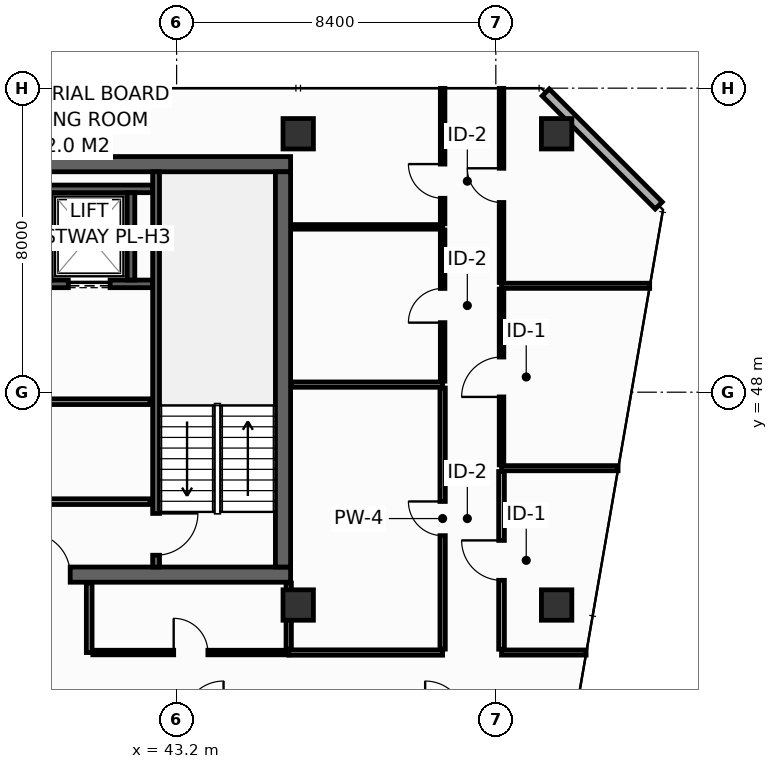
"""IFC4 building model, lengths in metres.
Left out: names, types, materials, properties, quantities, classifications, styles, units other than length and angle.
Written with IfcOpenShell. Run it as: python <this file> out.ifc"""

import sys

from ifc_helpers import new_model, si_unit, direction, frame, frame_2d, origin, origin_2d, place, context, subcontext, project, spatial, rectangle, hollow_rectangle, extrude, element, fill, save


model = new_model("IFC4")
c1 = context("Model", 3, precision=1e-05, world=origin(), true_north=direction((0.0, 1.0)))
c2 = subcontext(c1, "Body", "Model", "MODEL_VIEW")
j1 = project(units=[si_unit("LENGTHUNIT", "METRE"), si_unit("PLANEANGLEUNIT", "RADIAN")], contexts=[c1])
p1 = place(None, origin())
s1 = spatial("IfcSite", under=j1, at=p1, CompositionType="ELEMENT")
p2 = place(p1, origin())
s2 = spatial("IfcBuilding", under=s1, at=p2, CompositionType="ELEMENT")
p3 = place(p2, frame((0.0, 0.0, 245.8)))
s3 = spatial("IfcBuildingStorey", under=s2, at=p3, CompositionType="ELEMENT", Elevation=245.8)
p4 = place(p3, frame((13.7, 43.2, 0.0), z_axis=(0.0, 0.0, 1.0), x_axis=(1.0, 0.0, 0.0)))
e1 = element("IfcWall", 1, at=p4, inside=s3, PredefinedType="SHEAR", context=c2, shape_type="SweptSolid", body=[
    extrude(rectangle(XDim=32.5, YDim=0.4, at=frame_2d((16.25, 0.0))), origin(), (0.0, 0.0, 1.0), 3.55),
])
p5 = place(p4, frame((5.4, 0.0, 0.0)))
e2 = element("IfcOpeningElement", 2, at=p5, cuts=e1, PredefinedType="OPENING", context=c2, shape_type="SweptSolid", body=[
    extrude(rectangle(XDim=1.1, YDim=2.15, at=frame_2d((0.55, 1.075))), frame((0.0, 0.21, 0.0), z_axis=(0.0, -1.0, 0.0), x_axis=(1.0, 0.0, 0.0)), (0.0, 0.0, 1.0), 0.42),
])
p6 = place(p4, frame((25.6, 0.0, 0.0)))
e3 = element("IfcOpeningElement", 3, at=p6, cuts=e1, PredefinedType="OPENING", context=c2, shape_type="SweptSolid", body=[
    extrude(rectangle(XDim=1.1, YDim=2.15, at=frame_2d((0.55, 1.075))), frame((0.0, 0.21, 0.0), z_axis=(0.0, -1.0, 0.0), x_axis=(1.0, 0.0, 0.0)), (0.0, 0.0, 1.0), 0.42),
])
p7 = place(p3, frame((13.7, 54.0, 0.0), z_axis=(0.0, 0.0, 1.0), x_axis=(1.0, 0.0, 0.0)))
e4 = element("IfcWall", 4, at=p7, inside=s3, PredefinedType="SHEAR", context=c2, shape_type="SweptSolid", body=[
    extrude(rectangle(XDim=32.5, YDim=0.4, at=frame_2d((16.25, 0.0))), origin(), (0.0, 0.0, 1.0), 3.55),
])
p8 = place(p3, frame((46.0, 43.4, 0.0), z_axis=(0.0, 0.0, 1.0), x_axis=(0.0, 1.0, 0.0)))
e5 = element("IfcWall", 5, at=p8, inside=s3, PredefinedType="SHEAR", context=c2, shape_type="SweptSolid", body=[
    extrude(rectangle(XDim=10.4, YDim=0.4, at=frame_2d((5.2, 0.0))), origin(), (0.0, 0.0, 1.0), 3.55),
])
for number, where, z_axis, x_axis in (
    (6, (46.4, 54.8, 0.0), (0.0, 0.0, 1.0), (1.0, 0.0, 0.0)),
    (7, (53.2, 54.8, 0.0), (0.0, 0.0, 1.0), (1.0, 0.0, 0.0)),
    (8, (46.4, 42.4, 0.0), (0.0, 0.0, 1.0), (1.0, 0.0, 0.0)),
    (9, (53.2, 42.4, 0.0), (0.0, 0.0, 1.0), (1.0, 0.0, 0.0)),
):
    element("IfcColumn", number, at=place(p3, frame(where, z_axis=z_axis, x_axis=x_axis)), inside=s3, PredefinedType="COLUMN", context=c2, shape_type="SweptSolid", body=[
        extrude(hollow_rectangle(XDim=0.8, YDim=0.8, WallThickness=0.036, at=origin_2d()), origin(), (0.0, 0.0, 1.0), 3.8),
    ])
p9 = place(p3, frame((39.525, 50.85, 0.0), z_axis=(0.0, 0.0, 1.0), x_axis=(1.0, 0.0, 0.0)))
e10 = element("IfcWall", 10, at=p9, inside=s3, PredefinedType="SHEAR", context=c2, shape_type="SweptSolid", body=[
    extrude(rectangle(XDim=3.045, YDim=0.2, at=frame_2d((1.522, 0.0))), origin(), (0.0, 0.0, 1.0), 3.55),
])
p10 = place(p9, frame((0.825, 0.0, 0.0)))
e11 = element("IfcOpeningElement", 11, at=p10, cuts=e10, PredefinedType="OPENING", context=c2, shape_type="SweptSolid", body=[
    extrude(rectangle(XDim=1.1, YDim=2.2, at=frame_2d((0.55, 1.1))), frame((0.0, 0.11, 0.0), z_axis=(0.0, -1.0, 0.0), x_axis=(1.0, 0.0, 0.0)), (0.0, 0.0, 1.0), 0.22),
])
p11 = place(p3, frame((39.525, 53.35, 0.0), z_axis=(0.0, 0.0, 1.0), x_axis=(1.0, 0.0, 0.0)))
e12 = element("IfcWall", 12, at=p11, inside=s3, PredefinedType="SHEAR", context=c2, shape_type="SweptSolid", body=[
    extrude(rectangle(XDim=3.045, YDim=0.2, at=frame_2d((1.522, 0.0))), origin(), (0.0, 0.0, 1.0), 3.55),
])
p12 = place(p3, frame((42.0, 50.95, 0.0), z_axis=(0.0, 0.0, 1.0), x_axis=(0.0, 1.0, 0.0)))
e13 = element("IfcWall", 13, at=p12, inside=s3, PredefinedType="SHEAR", context=c2, shape_type="SweptSolid", body=[
    extrude(rectangle(XDim=2.3, YDim=0.2, at=frame_2d((1.15, 0.0))), origin(), (0.0, 0.0, 1.0), 3.55),
])
p13 = place(p3, frame((42.66, 53.8, 0.0), z_axis=(0.0, 0.0, 1.0), x_axis=(0.0, -1.0, 0.0)))
e14 = element("IfcWall", 14, at=p13, inside=s3, PredefinedType="SHEAR", context=c2, shape_type="SweptSolid", body=[
    extrude(rectangle(XDim=10.4, YDim=0.18, at=frame_2d((5.2, 0.0))), origin(), (0.0, 0.0, 1.0), 3.55),
])
p14 = place(p13, frame((8.99, 0.0, 0.0)))
e15 = element("IfcOpeningElement", 15, at=p14, cuts=e14, PredefinedType="OPENING", context=c2, shape_type="SweptSolid", body=[
    extrude(rectangle(XDim=1.1, YDim=2.15, at=frame_2d((0.55, 1.075))), frame((0.0, 0.1, 0.0), z_axis=(0.0, -1.0, 0.0), x_axis=(1.0, 0.0, 0.0)), (0.0, 0.0, 1.0), 0.2),
])
p15 = place(p3, frame((34.05, 45.12, 0.0), z_axis=(0.0, 0.0, 1.0), x_axis=(1.0, 0.0, 0.0)))
e16 = element("IfcWall", 16, at=p15, inside=s3, PredefinedType="PARTITIONING", context=c2, shape_type="SweptSolid", body=[
    extrude(rectangle(XDim=8.45, YDim=0.15, at=frame_2d((4.225, 0.0))), origin(), (0.0, 0.0, 1.0), 3.55),
])
p16 = place(p15, frame((3.6, 0.0, 0.0)))
e17 = element("IfcOpeningElement", 17, at=p16, cuts=e16, PredefinedType="OPENING", context=c2, shape_type="SweptSolid", body=[
    extrude(rectangle(XDim=0.95, YDim=2.15, at=frame_2d((0.475, 1.075))), frame((0.0, 0.085, 0.0), z_axis=(0.0, -1.0, 0.0), x_axis=(1.0, 0.0, 0.0)), (0.0, 0.0, 1.0), 0.17),
])
p17 = place(p3, frame((34.05, 47.75, 0.0), z_axis=(0.0, 0.0, 1.0), x_axis=(1.0, 0.0, 0.0)))
e18 = element("IfcWall", 18, at=p17, inside=s3, PredefinedType="PARTITIONING", context=c2, shape_type="SweptSolid", body=[
    extrude(rectangle(XDim=8.45, YDim=0.15, at=frame_2d((4.225, 0.0))), origin(), (0.0, 0.0, 1.0), 3.55),
])
p18 = place(p3, frame((55.887, 52.913, 0.0), z_axis=(0.0, 0.0, 1.0), x_axis=(-0.707106781187, 0.707106781187, 0.0)))
e19 = element("IfcWall", 19, at=p18, inside=s3, PredefinedType="STANDARD", context=c2, shape_type="SweptSolid", body=[
    extrude(rectangle(XDim=4.206, YDim=0.26, at=frame_2d((2.103, 0.0))), origin(), (0.0, 0.0, 1.0), 3.55),
])
p19 = place(p3, frame((46.15, 41.15, 0.0), z_axis=(0.0, 0.0, 1.0), x_axis=(1.0, 0.0, 0.0)))
e20 = element("IfcWall", 20, at=p19, inside=s3, PredefinedType="PARTITIONING", context=c2, shape_type="SweptSolid", body=[
    extrude(rectangle(XDim=4.05, YDim=0.14, at=frame_2d((2.025, 0.0))), origin(), (0.0, 0.0, 1.0), 3.55),
])
p20 = place(p3, frame((46.15, 41.24, 0.0), z_axis=(0.0, 0.0, 1.0), x_axis=(0.0, 1.0, 0.0)))
e21 = element("IfcWall", 21, at=p20, inside=s3, PredefinedType="PARTITIONING", context=c2, shape_type="SweptSolid", body=[
    extrude(rectangle(XDim=1.74, YDim=0.14, at=frame_2d((0.87, 0.0))), origin(), (0.0, 0.0, 1.0), 3.55),
])
p21 = place(p3, frame((46.22, 48.2, 0.0), z_axis=(0.0, 0.0, 1.0), x_axis=(1.0, 0.0, 0.0)))
e22 = element("IfcWall", 22, at=p21, inside=s3, PredefinedType="PARTITIONING", context=c2, shape_type="SweptSolid", body=[
    extrude(rectangle(XDim=3.98, YDim=0.14, at=frame_2d((1.99, 0.0))), origin(), (0.0, 0.0, 1.0), 3.55),
])
p22 = place(p3, frame((50.2, 41.24, 0.0), z_axis=(0.0, 0.0, 1.0), x_axis=(0.0, 1.0, 0.0)))
e23 = element("IfcWall", 23, at=p22, inside=s3, PredefinedType="PARTITIONING", context=c2, shape_type="SweptSolid", body=[
    extrude(rectangle(XDim=6.87, YDim=0.14, at=frame_2d((3.435, 0.0))), origin(), (0.0, 0.0, 1.0), 2.947),
])
p23 = place(p22, frame((2.985, 0.0, 0.0)))
e24 = element("IfcOpeningElement", 24, at=p23, cuts=e23, PredefinedType="OPENING", context=c2, shape_type="SweptSolid", body=[
    extrude(rectangle(XDim=0.9, YDim=2.1, at=frame_2d((0.45, 1.05))), frame((0.0, 0.08, 0.0), z_axis=(0.0, -1.0, 0.0), x_axis=(1.0, 0.0, 0.0)), (0.0, 0.0, 1.0), 0.16),
])
p24 = place(p3, frame((46.22, 52.35, 0.0), z_axis=(0.0, 0.0, 1.0), x_axis=(1.0, 0.0, 0.0)))
e25 = element("IfcWall", 25, at=p24, inside=s3, PredefinedType="PARTITIONING", context=c2, shape_type="SweptSolid", body=[
    extrude(rectangle(XDim=3.98, YDim=0.12, at=frame_2d((1.99, 0.0))), origin(), (0.0, 0.0, 1.0), 3.55),
])
p25 = place(p3, frame((50.2, 48.29, 0.0), z_axis=(0.0, 0.0, 1.0), x_axis=(0.0, 1.0, 0.0)))
e26 = element("IfcWall", 26, at=p25, inside=s3, PredefinedType="PARTITIONING", context=c2, shape_type="SweptSolid", body=[
    extrude(rectangle(XDim=3.98, YDim=0.12, at=frame_2d((1.99, 0.0))), origin(), (0.0, 0.0, 1.0), 3.55),
])
p26 = place(p25, frame((1.54, 0.0, 0.0)))
e27 = element("IfcOpeningElement", 27, at=p26, cuts=e26, PredefinedType="OPENING", context=c2, shape_type="SweptSolid", body=[
    extrude(rectangle(XDim=0.9, YDim=2.1, at=frame_2d((0.45, 1.05))), frame((0.0, 0.07, 0.0), z_axis=(0.0, -1.0, 0.0), x_axis=(1.0, 0.0, 0.0)), (0.0, 0.0, 1.0), 0.14),
])
p27 = place(p3, frame((50.2, 52.43, 0.0), z_axis=(0.0, 0.0, 1.0), x_axis=(0.0, 1.0, 0.0)))
e28 = element("IfcWall", 28, at=p27, inside=s3, PredefinedType="PARTITIONING", context=c2, shape_type="SweptSolid", body=[
    extrude(rectangle(XDim=3.565, YDim=0.12, at=frame_2d((1.783, 0.0))), origin(), (0.0, 0.0, 1.0), 2.935),
])
p28 = place(p27, frame((0.672, 0.0, 0.0)))
e29 = element("IfcOpeningElement", 29, at=p28, cuts=e28, PredefinedType="OPENING", context=c2, shape_type="SweptSolid", body=[
    extrude(rectangle(XDim=0.9, YDim=2.1, at=frame_2d((0.45, 1.05))), frame((0.0, 0.07, 0.0), z_axis=(0.0, -1.0, 0.0), x_axis=(1.0, 0.0, 0.0)), (0.0, 0.0, 1.0), 0.14),
])
p29 = place(p3, frame((51.75, 41.15, 0.0), z_axis=(0.0, 0.0, 1.0), x_axis=(1.0, 0.0, 0.0)))
e30 = element("IfcWall", 30, at=p29, inside=s3, PredefinedType="PARTITIONING", context=c2, shape_type="SweptSolid", body=[
    extrude(rectangle(XDim=2.226, YDim=0.135, at=frame_2d((1.113, 0.0))), origin(), (0.0, 0.0, 1.0), 3.085),
])
p30 = place(p3, frame((51.75, 46.0, 0.0), z_axis=(0.0, 0.0, 1.0), x_axis=(1.0, 0.0, 0.0)))
e31 = element("IfcWall", 31, at=p30, inside=s3, PredefinedType="PARTITIONING", context=c2, shape_type="SweptSolid", body=[
    extrude(rectangle(XDim=3.066, YDim=0.135, at=frame_2d((1.533, 0.0))), origin(), (0.0, 0.0, 1.0), 2.947),
])
p31 = place(p3, frame((51.75, 50.8, 0.0), z_axis=(0.0, 0.0, 1.0), x_axis=(1.0, 0.0, 0.0)))
e32 = element("IfcWall", 32, at=p31, inside=s3, PredefinedType="PARTITIONING", context=c2, shape_type="SweptSolid", body=[
    extrude(rectangle(XDim=3.898, YDim=0.135, at=frame_2d((1.949, 0.0))), origin(), (0.0, 0.0, 1.0), 2.947),
])
p32 = place(p3, frame((51.75, 41.238, 0.0), z_axis=(0.0, 0.0, 1.0), x_axis=(0.0, 1.0, 0.0)))
e33 = element("IfcWall", 33, at=p32, inside=s3, PredefinedType="PARTITIONING", context=c2, shape_type="SweptSolid", body=[
    extrude(rectangle(XDim=4.675, YDim=0.15, at=frame_2d((2.337, 0.0))), origin(), (0.0, 0.0, 1.0), 2.947),
])
p33 = place(p32, frame((1.813, 0.0, 0.0)))
e34 = element("IfcOpeningElement", 34, at=p33, cuts=e33, PredefinedType="OPENING", context=c2, shape_type="SweptSolid", body=[
    extrude(rectangle(XDim=1.05, YDim=2.15, at=frame_2d((0.525, 1.075))), frame((0.0, 0.085, 0.0), z_axis=(0.0, -1.0, 0.0), x_axis=(1.0, 0.0, 0.0)), (0.0, 0.0, 1.0), 0.17),
])
p34 = place(p3, frame((51.75, 46.087, 0.0), z_axis=(0.0, 0.0, 1.0), x_axis=(0.0, 1.0, 0.0)))
e35 = element("IfcWall", 35, at=p34, inside=s3, PredefinedType="PARTITIONING", context=c2, shape_type="SweptSolid", body=[
    extrude(rectangle(XDim=4.625, YDim=0.12, at=frame_2d((2.312, 0.0))), origin(), (0.0, 0.0, 1.0), 3.55),
])
p35 = place(p34, frame((1.788, 0.0, 0.0)))
e36 = element("IfcOpeningElement", 36, at=p35, cuts=e35, PredefinedType="OPENING", context=c2, shape_type="SweptSolid", body=[
    extrude(rectangle(XDim=1.05, YDim=2.15, at=frame_2d((0.525, 1.075))), frame((0.0, 0.07, 0.0), z_axis=(0.0, -1.0, 0.0), x_axis=(1.0, 0.0, 0.0)), (0.0, 0.0, 1.0), 0.14),
])
p36 = place(p3, frame((51.75, 50.887, 0.0), z_axis=(0.0, 0.0, 1.0), x_axis=(0.0, 1.0, 0.0)))
e37 = element("IfcWall", 37, at=p36, inside=s3, PredefinedType="PARTITIONING", context=c2, shape_type="SweptSolid", body=[
    extrude(rectangle(XDim=5.108, YDim=0.12, at=frame_2d((2.554, 0.0))), origin(), (0.0, 0.0, 1.0), 2.935),
])
p37 = place(p36, frame((2.104, 0.0, 0.0)))
e38 = element("IfcOpeningElement", 38, at=p37, cuts=e37, PredefinedType="OPENING", context=c2, shape_type="SweptSolid", body=[
    extrude(rectangle(XDim=0.9, YDim=2.1, at=frame_2d((0.45, 1.05))), frame((0.0, 0.07, 0.0), z_axis=(0.0, -1.0, 0.0), x_axis=(1.0, 0.0, 0.0)), (0.0, 0.0, 1.0), 0.14),
])
p38 = place(p3, frame((40.9, 41.15, 0.0), z_axis=(0.0, 0.0, 1.0), x_axis=(0.0, 1.0, 0.0)))
e39 = element("IfcWall", 39, at=p38, inside=s3, PredefinedType="PARTITIONING", context=c2, shape_type="SweptSolid", body=[
    extrude(rectangle(XDim=1.83, YDim=0.15, at=frame_2d((0.915, 0.0))), origin(), (0.0, 0.0, 1.0), 3.55),
])
p39 = place(p3, frame((40.995, 41.15, 0.0), z_axis=(0.0, 0.0, 1.0), x_axis=(1.0, 0.0, 0.0)))
e40 = element("IfcWall", 40, at=p39, inside=s3, PredefinedType="PARTITIONING", context=c2, shape_type="SweptSolid", body=[
    extrude(rectangle(XDim=5.155, YDim=0.12, at=frame_2d((2.577, 0.0))), origin(), (0.0, 0.0, 1.0), 3.55),
])
p40 = place(p39, frame((2.128, 0.0, 0.0)))
e41 = element("IfcOpeningElement", 41, at=p40, cuts=e40, PredefinedType="OPENING", context=c2, shape_type="SweptSolid", body=[
    extrude(rectangle(XDim=0.9, YDim=2.1, at=frame_2d((0.45, 1.05))), frame((0.0, 0.07, 0.0), z_axis=(0.0, -1.0, 0.0), x_axis=(1.0, 0.0, 0.0)), (0.0, 0.0, 1.0), 0.14),
])
p41 = place(p10, origin())
e42 = element("IfcDoor", 42, at=p41, inside=s3, OperationType="SLIDING_TO_LEFT", PredefinedType="DOOR", context=c2, shape_type="SweptSolid", body=[
    extrude(rectangle(XDim=1.1, YDim=2.2, at=frame_2d((0.55, 1.1))), frame((0.0, 0.025, 0.0), z_axis=(0.0, -1.0, 0.0), x_axis=(1.0, 0.0, 0.0)), (0.0, 0.0, 1.0), 0.05),
])
fill(e11, e42)
p42 = place(p14, origin())
e43 = element("IfcDoor", 43, at=p42, inside=s3, OperationType="SINGLE_SWING_LEFT", PredefinedType="DOOR", context=c2, shape_type="SweptSolid", body=[
    extrude(rectangle(XDim=1.1, YDim=2.15, at=frame_2d((0.55, 1.075))), frame((0.0, 0.025, 0.0), z_axis=(0.0, -1.0, 0.0), x_axis=(1.0, 0.0, 0.0)), (0.0, 0.0, 1.0), 0.05),
])
fill(e15, e43)
p43 = place(p6, origin())
e44 = element("IfcDoor", 44, at=p43, inside=s3, OperationType="SINGLE_SWING_LEFT", PredefinedType="DOOR", context=c2, shape_type="SweptSolid", body=[
    extrude(rectangle(XDim=1.1, YDim=2.15, at=frame_2d((0.55, 1.075))), frame((0.0, 0.025, 0.0), z_axis=(0.0, -1.0, 0.0), x_axis=(1.0, 0.0, 0.0)), (0.0, 0.0, 1.0), 0.05),
])
fill(e3, e44)
p44 = place(p23, origin())
e45 = element("IfcDoor", 45, at=p44, inside=s3, OperationType="SINGLE_SWING_RIGHT", PredefinedType="DOOR", context=c2, shape_type="SweptSolid", body=[
    extrude(rectangle(XDim=0.9, YDim=2.1, at=frame_2d((0.45, 1.05))), frame((0.0, 0.025, 0.0), z_axis=(0.0, -1.0, 0.0), x_axis=(1.0, 0.0, 0.0)), (0.0, 0.0, 1.0), 0.05),
])
fill(e24, e45)
p45 = place(p26, origin())
e46 = element("IfcDoor", 46, at=p45, inside=s3, OperationType="SINGLE_SWING_LEFT", PredefinedType="DOOR", context=c2, shape_type="SweptSolid", body=[
    extrude(rectangle(XDim=0.9, YDim=2.1, at=frame_2d((0.45, 1.05))), frame((0.0, 0.025, 0.0), z_axis=(0.0, -1.0, 0.0), x_axis=(1.0, 0.0, 0.0)), (0.0, 0.0, 1.0), 0.05),
])
fill(e27, e46)
p46 = place(p28, origin())
e47 = element("IfcDoor", 47, at=p46, inside=s3, OperationType="SINGLE_SWING_RIGHT", PredefinedType="DOOR", context=c2, shape_type="SweptSolid", body=[
    extrude(rectangle(XDim=0.9, YDim=2.1, at=frame_2d((0.45, 1.05))), frame((0.0, 0.025, 0.0), z_axis=(0.0, -1.0, 0.0), x_axis=(1.0, 0.0, 0.0)), (0.0, 0.0, 1.0), 0.05),
])
fill(e29, e47)
p47 = place(p33, origin())
e48 = element("IfcDoor", 48, at=p47, inside=s3, OperationType="SINGLE_SWING_RIGHT", PredefinedType="DOOR", context=c2, shape_type="SweptSolid", body=[
    extrude(rectangle(XDim=1.05, YDim=2.15, at=frame_2d((0.525, 1.075))), frame((0.0, 0.025, 0.0), z_axis=(0.0, -1.0, 0.0), x_axis=(1.0, 0.0, 0.0)), (0.0, 0.0, 1.0), 0.05),
])
fill(e34, e48)
p48 = place(p35, origin())
e49 = element("IfcDoor", 49, at=p48, inside=s3, OperationType="SINGLE_SWING_LEFT", PredefinedType="DOOR", context=c2, shape_type="SweptSolid", body=[
    extrude(rectangle(XDim=1.05, YDim=2.15, at=frame_2d((0.525, 1.075))), frame((0.0, 0.025, 0.0), z_axis=(0.0, -1.0, 0.0), x_axis=(1.0, 0.0, 0.0)), (0.0, 0.0, 1.0), 0.05),
])
fill(e36, e49)
p49 = place(p37, origin())
e50 = element("IfcDoor", 50, at=p49, inside=s3, OperationType="SINGLE_SWING_RIGHT", PredefinedType="DOOR", context=c2, shape_type="SweptSolid", body=[
    extrude(rectangle(XDim=0.9, YDim=2.1, at=frame_2d((0.45, 1.05))), frame((0.0, 0.025, 0.0), z_axis=(0.0, -1.0, 0.0), x_axis=(1.0, 0.0, 0.0)), (0.0, 0.0, 1.0), 0.05),
])
fill(e38, e50)
p50 = place(p40, origin())
e51 = element("IfcDoor", 51, at=p50, inside=s3, OperationType="SINGLE_SWING_LEFT", PredefinedType="DOOR", context=c2, shape_type="SweptSolid", body=[
    extrude(rectangle(XDim=0.9, YDim=2.1, at=frame_2d((0.45, 1.05))), frame((0.0, 0.025, 0.0), z_axis=(0.0, -1.0, 0.0), x_axis=(1.0, 0.0, 0.0)), (0.0, 0.0, 1.0), 0.05),
])
fill(e41, e51)
save(model, sys.argv[1])
